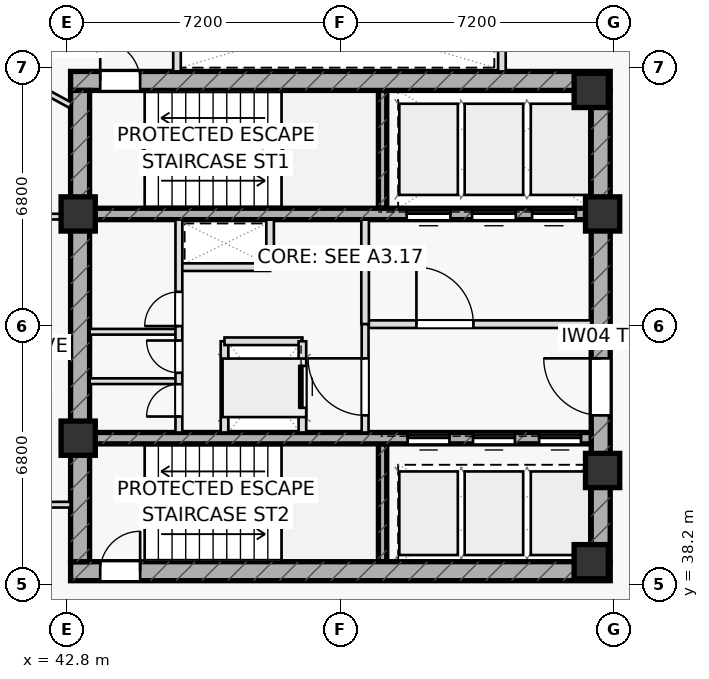
"""IFC4 building model, lengths in metres.
Left out: names, types, materials, properties, quantities, classifications, styles, units other than length and angle.
Written with IfcOpenShell. Run it as: python <this file> out.ifc"""

import sys

from ifc_helpers import new_model, si_unit, direction, frame, frame_2d, origin, origin_2d, place, context, subcontext, project, spatial, rectangle, extrude, element, fill, save


model = new_model("IFC4")
c1 = context("Model", 3, precision=1e-05, world=origin(), true_north=direction((0.0, 1.0)))
c2 = subcontext(c1, "Body", "Model", "MODEL_VIEW")
j1 = project(units=[si_unit("LENGTHUNIT", "METRE"), si_unit("PLANEANGLEUNIT", "RADIAN")], contexts=[c1])
p1 = place(None, origin())
s1 = spatial("IfcSite", under=j1, at=p1, CompositionType="ELEMENT")
p2 = place(p1, origin())
s2 = spatial("IfcBuilding", under=s1, at=p2, CompositionType="ELEMENT")
p3 = place(p2, frame((0.0, 0.0, 177.2)))
s3 = spatial("IfcBuildingStorey", under=s2, at=p3, CompositionType="ELEMENT", Elevation=177.2)
for number, where, z_axis, x_axis in (
    (1, (51.11, 48.1, 0.0), (0.0, 0.0, 1.0), (0.0, 1.0, 0.0)),
    (2, (51.11, 38.8, 0.0), (0.0, 0.0, 1.0), (0.0, 1.0, 0.0)),
):
    element("IfcWall", number, at=place(p3, frame(where, z_axis=z_axis, x_axis=x_axis)), inside=s3, PredefinedType="SHEAR", context=c2, shape_type="SweptSolid", body=[
        extrude(rectangle(XDim=3.1, YDim=0.22, at=frame_2d((1.55, 0.0))), origin(), (0.0, 0.0, 1.0), 3.55),
    ])
p4 = place(p3, frame((42.9, 51.45, 0.0), z_axis=(0.0, 0.0, 1.0), x_axis=(1.0, 0.0, 0.0)))
e3 = element("IfcWall", 3, at=p4, inside=s3, PredefinedType="SHEAR", context=c2, shape_type="SweptSolid", body=[
    extrude(rectangle(XDim=14.2, YDim=0.5, at=frame_2d((7.1, 0.0))), origin(), (0.0, 0.0, 1.0), 3.55),
])
p5 = place(p4, frame((0.78, 0.0, 0.0)))
e4 = element("IfcOpeningElement", 4, at=p5, cuts=e3, PredefinedType="OPENING", context=c2, shape_type="SweptSolid", body=[
    extrude(rectangle(XDim=1.05, YDim=2.2, at=frame_2d((0.525, 1.1))), frame((0.0, 0.26, 0.0), z_axis=(0.0, -1.0, 0.0), x_axis=(1.0, 0.0, 0.0)), (0.0, 0.0, 1.0), 0.52),
])
p6 = place(p3, frame((42.9, 38.55, 0.0), z_axis=(0.0, 0.0, 1.0), x_axis=(1.0, 0.0, 0.0)))
e5 = element("IfcWall", 5, at=p6, inside=s3, PredefinedType="SHEAR", context=c2, shape_type="SweptSolid", body=[
    extrude(rectangle(XDim=14.2, YDim=0.5, at=frame_2d((7.1, 0.0))), origin(), (0.0, 0.0, 1.0), 3.55),
])
p7 = place(p6, frame((0.78, 0.0, 0.0)))
e6 = element("IfcOpeningElement", 6, at=p7, cuts=e5, PredefinedType="OPENING", context=c2, shape_type="SweptSolid", body=[
    extrude(rectangle(XDim=1.05, YDim=2.2, at=frame_2d((0.525, 1.1))), frame((0.0, 0.26, 0.0), z_axis=(0.0, -1.0, 0.0), x_axis=(1.0, 0.0, 0.0)), (0.0, 0.0, 1.0), 0.52),
])
p8 = place(p3, frame((43.15, 38.8, 0.0), z_axis=(0.0, 0.0, 1.0), x_axis=(0.0, 1.0, 0.0)))
e7 = element("IfcWall", 7, at=p8, inside=s3, PredefinedType="SHEAR", context=c2, shape_type="SweptSolid", body=[
    extrude(rectangle(XDim=12.4, YDim=0.5, at=frame_2d((6.2, 0.0))), origin(), (0.0, 0.0, 1.0), 3.55),
])
p9 = place(p3, frame((56.85, 38.8, 0.0), z_axis=(0.0, 0.0, 1.0), x_axis=(0.0, 1.0, 0.0)))
e8 = element("IfcWall", 8, at=p9, inside=s3, PredefinedType="SHEAR", context=c2, shape_type="SweptSolid", body=[
    extrude(rectangle(XDim=12.4, YDim=0.5, at=frame_2d((6.2, 0.0))), origin(), (0.0, 0.0, 1.0), 3.55),
])
p10 = place(p9, frame((3.85, 0.0, 0.0)))
e9 = element("IfcOpeningElement", 9, at=p10, cuts=e8, PredefinedType="OPENING", context=c2, shape_type="SweptSolid", body=[
    extrude(rectangle(XDim=1.5, YDim=2.2, at=frame_2d((0.75, 1.1))), frame((0.0, 0.26, 0.0), z_axis=(0.0, -1.0, 0.0), x_axis=(1.0, 0.0, 0.0)), (0.0, 0.0, 1.0), 0.52),
])
p11 = place(p3, frame((43.4, 47.95, 0.0), z_axis=(0.0, 0.0, 1.0), x_axis=(1.0, 0.0, 0.0)))
e10 = element("IfcWall", 10, at=p11, inside=s3, PredefinedType="SHEAR", context=c2, shape_type="SweptSolid", body=[
    extrude(rectangle(XDim=13.2, YDim=0.3, at=frame_2d((6.6, 0.0))), origin(), (0.0, 0.0, 1.0), 3.55),
])
p12 = place(p11, frame((8.345, 0.0, 0.0)))
e11 = element("IfcOpeningElement", 11, at=p12, cuts=e10, PredefinedType="OPENING", context=c2, shape_type="SweptSolid", body=[
    extrude(rectangle(XDim=1.15, YDim=2.2, at=frame_2d((0.575, 1.1))), frame((0.0, 0.16, 0.0), z_axis=(0.0, -1.0, 0.0), x_axis=(1.0, 0.0, 0.0)), (0.0, 0.0, 1.0), 0.32),
])
p13 = place(p11, frame((10.065, 0.0, 0.0)))
e12 = element("IfcOpeningElement", 12, at=p13, cuts=e10, PredefinedType="OPENING", context=c2, shape_type="SweptSolid", body=[
    extrude(rectangle(XDim=1.15, YDim=2.2, at=frame_2d((0.575, 1.1))), frame((0.0, 0.16, 0.0), z_axis=(0.0, -1.0, 0.0), x_axis=(1.0, 0.0, 0.0)), (0.0, 0.0, 1.0), 0.32),
])
p14 = place(p11, frame((11.645, 0.0, 0.0)))
e13 = element("IfcOpeningElement", 13, at=p14, cuts=e10, PredefinedType="OPENING", context=c2, shape_type="SweptSolid", body=[
    extrude(rectangle(XDim=1.15, YDim=2.2, at=frame_2d((0.575, 1.1))), frame((0.0, 0.16, 0.0), z_axis=(0.0, -1.0, 0.0), x_axis=(1.0, 0.0, 0.0)), (0.0, 0.0, 1.0), 0.32),
])
p15 = place(p3, frame((43.4, 42.05, 0.0), z_axis=(0.0, 0.0, 1.0), x_axis=(1.0, 0.0, 0.0)))
e14 = element("IfcWall", 14, at=p15, inside=s3, PredefinedType="SHEAR", context=c2, shape_type="SweptSolid", body=[
    extrude(rectangle(XDim=13.2, YDim=0.3, at=frame_2d((6.6, 0.0))), origin(), (0.0, 0.0, 1.0), 3.55),
])
p16 = place(p15, frame((8.37, 0.0, 0.0)))
e15 = element("IfcOpeningElement", 15, at=p16, cuts=e14, PredefinedType="OPENING", context=c2, shape_type="SweptSolid", body=[
    extrude(rectangle(XDim=1.1, YDim=2.15, at=frame_2d((0.55, 1.075))), frame((0.0, 0.16, 0.0), z_axis=(0.0, -1.0, 0.0), x_axis=(1.0, 0.0, 0.0)), (0.0, 0.0, 1.0), 0.32),
])
p17 = place(p15, frame((10.09, 0.0, 0.0)))
e16 = element("IfcOpeningElement", 16, at=p17, cuts=e14, PredefinedType="OPENING", context=c2, shape_type="SweptSolid", body=[
    extrude(rectangle(XDim=1.1, YDim=2.15, at=frame_2d((0.55, 1.075))), frame((0.0, 0.16, 0.0), z_axis=(0.0, -1.0, 0.0), x_axis=(1.0, 0.0, 0.0)), (0.0, 0.0, 1.0), 0.32),
])
p18 = place(p15, frame((11.83, 0.0, 0.0)))
e17 = element("IfcOpeningElement", 17, at=p18, cuts=e14, PredefinedType="OPENING", context=c2, shape_type="SweptSolid", body=[
    extrude(rectangle(XDim=1.1, YDim=2.15, at=frame_2d((0.55, 1.075))), frame((0.0, 0.16, 0.0), z_axis=(0.0, -1.0, 0.0), x_axis=(1.0, 0.0, 0.0)), (0.0, 0.0, 1.0), 0.32),
])
for number, where, z_axis, x_axis in (
    (18, (43.1, 47.95, 0.0), (0.0, 0.0, 1.0), (1.0, 0.0, 0.0)),
    (19, (56.9, 47.95, 0.0), (0.0, 0.0, 1.0), (1.0, 0.0, 0.0)),
    (20, (56.6, 51.2, 0.0), (0.0, 0.0, 1.0), (1.0, 0.0, 0.0)),
    (21, (43.1, 42.05, 0.0), (0.0, 0.0, 1.0), (1.0, 0.0, 0.0)),
    (22, (56.9, 41.2, 0.0), (0.0, 0.0, 1.0), (1.0, 0.0, 0.0)),
    (23, (56.6, 38.8, 0.0), (0.0, 0.0, 1.0), (1.0, 0.0, 0.0)),
):
    element("IfcColumn", number, at=place(p3, frame(where, z_axis=z_axis, x_axis=x_axis)), inside=s3, PredefinedType="COLUMN", context=c2, shape_type="SweptSolid", body=[
        extrude(rectangle(XDim=0.9, YDim=0.9, at=origin_2d()), origin(), (0.0, 0.0, 1.0), 3.55),
    ])
for number, where, z_axis, x_axis in (
    (24, (45.7, 51.7, 0.0), (0.0, 0.0, 1.0), (0.0, 1.0, 0.0)),
    (25, (54.25, 51.7, 0.0), (0.0, 0.0, 1.0), (0.0, 1.0, 0.0)),
):
    element("IfcWall", number, at=place(p3, frame(where, z_axis=z_axis, x_axis=x_axis)), inside=s3, PredefinedType="PARTITIONING", context=c2, shape_type="SweptSolid", body=[
        extrude(rectangle(XDim=2.6, YDim=0.2, at=frame_2d((1.3, 0.0))), origin(), (0.0, 0.0, 1.0), 3.55),
    ])
p19 = place(p3, frame((45.75, 46.55, 0.0), z_axis=(0.0, 0.0, 1.0), x_axis=(1.0, 0.0, 0.0)))
e26 = element("IfcWall", 26, at=p19, inside=s3, PredefinedType="PARTITIONING", context=c2, shape_type="SweptSolid", body=[
    extrude(rectangle(XDim=2.4, YDim=0.2, at=frame_2d((1.2, 0.0))), origin(), (0.0, 0.0, 1.0), 3.55),
])
p20 = place(p3, frame((48.15, 46.55, 0.0), z_axis=(0.0, 0.0, 1.0), x_axis=(0.0, 1.0, 0.0)))
e27 = element("IfcWall", 27, at=p20, inside=s3, PredefinedType="PARTITIONING", context=c2, shape_type="SweptSolid", body=[
    extrude(rectangle(XDim=1.25, YDim=0.2, at=frame_2d((0.625, 0.0))), origin(), (0.0, 0.0, 1.0), 3.55),
])
p21 = place(p3, frame((46.95, 42.2, 0.0), z_axis=(0.0, 0.0, 1.0), x_axis=(0.0, 1.0, 0.0)))
e28 = element("IfcWall", 28, at=p21, inside=s3, PredefinedType="PARTITIONING", context=c2, shape_type="SweptSolid", body=[
    extrude(rectangle(XDim=2.4, YDim=0.2, at=frame_2d((1.2, 0.0))), origin(), (0.0, 0.0, 1.0), 3.55),
])
p22 = place(p3, frame((46.95, 44.6, 0.0), z_axis=(0.0, 0.0, 1.0), x_axis=(1.0, 0.0, 0.0)))
e29 = element("IfcWall", 29, at=p22, inside=s3, PredefinedType="PARTITIONING", context=c2, shape_type="SweptSolid", body=[
    extrude(rectangle(XDim=2.05, YDim=0.2, at=frame_2d((1.025, 0.0))), origin(), (0.0, 0.0, 1.0), 3.55),
])
p23 = place(p3, frame((50.65, 45.05, 0.0), z_axis=(0.0, 0.0, 1.0), x_axis=(1.0, 0.0, 0.0)))
e30 = element("IfcWall", 30, at=p23, inside=s3, PredefinedType="PARTITIONING", context=c2, shape_type="SweptSolid", body=[
    extrude(rectangle(XDim=5.95, YDim=0.2, at=frame_2d((2.975, 0.0))), origin(), (0.0, 0.0, 1.0), 3.55),
])
p24 = place(p23, frame((1.35, 0.0, 0.0)))
e31 = element("IfcOpeningElement", 31, at=p24, cuts=e30, PredefinedType="OPENING", context=c2, shape_type="SweptSolid", body=[
    extrude(rectangle(XDim=1.5, YDim=2.2, at=frame_2d((0.75, 1.1))), frame((0.0, 0.11, 0.0), z_axis=(0.0, -1.0, 0.0), x_axis=(1.0, 0.0, 0.0)), (0.0, 0.0, 1.0), 0.22),
])
p25 = place(p3, frame((50.65, 45.05, 0.0), z_axis=(0.0, 0.0, 1.0), x_axis=(0.0, 1.0, 0.0)))
e32 = element("IfcWall", 32, at=p25, inside=s3, PredefinedType="PARTITIONING", context=c2, shape_type="SweptSolid", body=[
    extrude(rectangle(XDim=2.75, YDim=0.2, at=frame_2d((1.375, 0.0))), origin(), (0.0, 0.0, 1.0), 3.55),
])
p26 = place(p3, frame((50.65, 42.2, 0.0), z_axis=(0.0, 0.0, 1.0), x_axis=(0.0, 1.0, 0.0)))
e33 = element("IfcWall", 33, at=p26, inside=s3, PredefinedType="PARTITIONING", context=c2, shape_type="SweptSolid", body=[
    extrude(rectangle(XDim=2.85, YDim=0.18, at=frame_2d((1.425, 0.0))), origin(), (0.0, 0.0, 1.0), 3.55),
])
p27 = place(p26, frame((0.45, 0.0, 0.0)))
e34 = element("IfcOpeningElement", 34, at=p27, cuts=e33, PredefinedType="OPENING", context=c2, shape_type="SweptSolid", body=[
    extrude(rectangle(XDim=1.5, YDim=2.2, at=frame_2d((0.75, 1.1))), frame((0.0, 0.1, 0.0), z_axis=(0.0, -1.0, 0.0), x_axis=(1.0, 0.0, 0.0)), (0.0, 0.0, 1.0), 0.2),
])
for number, where, z_axis, x_axis in (
    (35, (43.4, 43.55, 0.0), (0.0, 0.0, 1.0), (1.0, 0.0, 0.0)),
    (36, (43.4, 44.85, 0.0), (0.0, 0.0, 1.0), (1.0, 0.0, 0.0)),
):
    element("IfcWall", number, at=place(p3, frame(where, z_axis=z_axis, x_axis=x_axis)), inside=s3, PredefinedType="PARTITIONING", context=c2, shape_type="SweptSolid", body=[
        extrude(rectangle(XDim=2.35, YDim=0.15, at=frame_2d((1.175, 0.0))), origin(), (0.0, 0.0, 1.0), 3.55),
    ])
p28 = place(p3, frame((45.75, 42.2, 0.0), z_axis=(0.0, 0.0, 1.0), x_axis=(0.0, 1.0, 0.0)))
e37 = element("IfcWall", 37, at=p28, inside=s3, PredefinedType="PARTITIONING", context=c2, shape_type="SweptSolid", body=[
    extrude(rectangle(XDim=5.6, YDim=0.18, at=frame_2d((2.8, 0.0))), origin(), (0.0, 0.0, 1.0), 3.55),
])
p29 = place(p28, frame((0.42, 0.0, 0.0)))
e38 = element("IfcOpeningElement", 38, at=p29, cuts=e37, PredefinedType="OPENING", context=c2, shape_type="SweptSolid", body=[
    extrude(rectangle(XDim=0.85, YDim=2.05, at=frame_2d((0.425, 1.025))), frame((0.0, 0.1, 0.0), z_axis=(0.0, -1.0, 0.0), x_axis=(1.0, 0.0, 0.0)), (0.0, 0.0, 1.0), 0.2),
])
p30 = place(p28, frame((1.57, 0.0, 0.0)))
e39 = element("IfcOpeningElement", 39, at=p30, cuts=e37, PredefinedType="OPENING", context=c2, shape_type="SweptSolid", body=[
    extrude(rectangle(XDim=0.85, YDim=2.05, at=frame_2d((0.425, 1.025))), frame((0.0, 0.1, 0.0), z_axis=(0.0, -1.0, 0.0), x_axis=(1.0, 0.0, 0.0)), (0.0, 0.0, 1.0), 0.2),
])
p31 = place(p28, frame((2.8, 0.0, 0.0)))
e40 = element("IfcOpeningElement", 40, at=p31, cuts=e37, PredefinedType="OPENING", context=c2, shape_type="SweptSolid", body=[
    extrude(rectangle(XDim=0.9, YDim=2.05, at=frame_2d((0.45, 1.025))), frame((0.0, 0.1, 0.0), z_axis=(0.0, -1.0, 0.0), x_axis=(1.0, 0.0, 0.0)), (0.0, 0.0, 1.0), 0.2),
])
p32 = place(p3, frame((37.14, 40.3, 0.0), z_axis=(0.0, 0.0, 1.0), x_axis=(1.0, 0.0, 0.0)))
e41 = element("IfcWall", 41, at=p32, inside=s3, PredefinedType="PARTITIONING", context=c2, shape_type="SweptSolid", body=[
    extrude(rectangle(XDim=5.76, YDim=0.15, at=frame_2d((2.88, 0.0))), origin(), (0.0, 0.0, 1.0), 3.55),
])
p33 = place(p32, frame((3.21, 0.0, 0.0)))
e42 = element("IfcOpeningElement", 42, at=p33, cuts=e41, PredefinedType="OPENING", context=c2, shape_type="SweptSolid", body=[
    extrude(rectangle(XDim=0.95, YDim=2.05, at=frame_2d((0.475, 1.025))), frame((0.0, 0.085, 0.0), z_axis=(0.0, -1.0, 0.0), x_axis=(1.0, 0.0, 0.0)), (0.0, 0.0, 1.0), 0.17),
])
p34 = place(p3, frame((37.14, 47.88, 0.0), z_axis=(0.0, 0.0, 1.0), x_axis=(1.0, 0.0, 0.0)))
e43 = element("IfcWall", 43, at=p34, inside=s3, PredefinedType="PARTITIONING", context=c2, shape_type="SweptSolid", body=[
    extrude(rectangle(XDim=5.76, YDim=0.15, at=frame_2d((2.88, 0.0))), origin(), (0.0, 0.0, 1.0), 2.935),
])
p35 = place(p3, frame((42.9, 50.81, 0.0), z_axis=(0.0, 0.0, 1.0), x_axis=(-0.878810866854, 0.477170263427, 0.0)))
e44 = element("IfcWall", 44, at=p35, inside=s3, PredefinedType="PARTITIONING", context=c2, shape_type="SweptSolid", body=[
    extrude(rectangle(XDim=10.858, YDim=0.15, at=frame_2d((5.429, 0.0))), origin(), (0.0, 0.0, 1.0), 2.935),
])
p36 = place(p35, frame((1.35, 0.0, 0.0)))
e45 = element("IfcOpeningElement", 45, at=p36, cuts=e44, PredefinedType="OPENING", context=c2, shape_type="SweptSolid", body=[
    extrude(rectangle(XDim=0.95, YDim=2.05, at=frame_2d((0.475, 1.025))), frame((0.0, 0.085, 0.0), z_axis=(0.0, -1.0, 0.0), x_axis=(1.0, 0.0, 0.0)), (0.0, 0.0, 1.0), 0.17),
])
p37 = place(p3, frame((49.0, 42.2, 0.0), z_axis=(0.0, 0.0, 1.0), x_axis=(0.0, 1.0, 0.0)))
e46 = element("IfcWall", 46, at=p37, inside=s3, PredefinedType="PARTITIONING", context=c2, shape_type="SweptSolid", body=[
    extrude(rectangle(XDim=2.4, YDim=0.2, at=frame_2d((1.2, 0.0))), origin(), (0.0, 0.0, 1.0), 3.55),
])
p38 = place(p37, frame((0.65, 0.0, 0.0)))
e47 = element("IfcOpeningElement", 47, at=p38, cuts=e46, PredefinedType="OPENING", context=c2, shape_type="SweptSolid", body=[
    extrude(rectangle(XDim=1.1, YDim=2.15, at=frame_2d((0.55, 1.075))), frame((0.0, 0.11, 0.0), z_axis=(0.0, -1.0, 0.0), x_axis=(1.0, 0.0, 0.0)), (0.0, 0.0, 1.0), 0.22),
])
p39 = place(p5, origin())
e48 = element("IfcDoor", 48, at=p39, inside=s3, OperationType="SINGLE_SWING_LEFT", PredefinedType="DOOR", context=c2, shape_type="SweptSolid", body=[
    extrude(rectangle(XDim=1.05, YDim=2.2, at=frame_2d((0.525, 1.1))), frame((0.0, 0.025, 0.0), z_axis=(0.0, -1.0, 0.0), x_axis=(1.0, 0.0, 0.0)), (0.0, 0.0, 1.0), 0.05),
])
fill(e4, e48)
p40 = place(p7, origin())
e49 = element("IfcDoor", 49, at=p40, inside=s3, OperationType="SINGLE_SWING_RIGHT", PredefinedType="DOOR", context=c2, shape_type="SweptSolid", body=[
    extrude(rectangle(XDim=1.05, YDim=2.2, at=frame_2d((0.525, 1.1))), frame((0.0, 0.025, 0.0), z_axis=(0.0, -1.0, 0.0), x_axis=(1.0, 0.0, 0.0)), (0.0, 0.0, 1.0), 0.05),
])
fill(e6, e49)
p41 = place(p10, origin())
e50 = element("IfcDoor", 50, at=p41, inside=s3, OperationType="SINGLE_SWING_RIGHT", PredefinedType="DOOR", context=c2, shape_type="SweptSolid", body=[
    extrude(rectangle(XDim=1.5, YDim=2.2, at=frame_2d((0.75, 1.1))), frame((0.0, 0.025, 0.0), z_axis=(0.0, -1.0, 0.0), x_axis=(1.0, 0.0, 0.0)), (0.0, 0.0, 1.0), 0.05),
])
fill(e9, e50)
p42 = place(p24, origin())
e51 = element("IfcDoor", 51, at=p42, inside=s3, OperationType="SINGLE_SWING_LEFT", PredefinedType="DOOR", context=c2, shape_type="SweptSolid", body=[
    extrude(rectangle(XDim=1.5, YDim=2.2, at=frame_2d((0.75, 1.1))), frame((0.0, 0.025, 0.0), z_axis=(0.0, -1.0, 0.0), x_axis=(1.0, 0.0, 0.0)), (0.0, 0.0, 1.0), 0.05),
])
fill(e31, e51)
p43 = place(p27, origin())
e52 = element("IfcDoor", 52, at=p43, inside=s3, OperationType="SINGLE_SWING_RIGHT", PredefinedType="DOOR", context=c2, shape_type="SweptSolid", body=[
    extrude(rectangle(XDim=1.5, YDim=2.2, at=frame_2d((0.75, 1.1))), frame((0.0, 0.025, 0.0), z_axis=(0.0, -1.0, 0.0), x_axis=(1.0, 0.0, 0.0)), (0.0, 0.0, 1.0), 0.05),
])
fill(e34, e52)
p44 = place(p29, origin())
e53 = element("IfcDoor", 53, at=p44, inside=s3, OperationType="SINGLE_SWING_LEFT", PredefinedType="DOOR", context=c2, shape_type="SweptSolid", body=[
    extrude(rectangle(XDim=0.85, YDim=2.05, at=frame_2d((0.425, 1.025))), frame((0.0, 0.025, 0.0), z_axis=(0.0, -1.0, 0.0), x_axis=(1.0, 0.0, 0.0)), (0.0, 0.0, 1.0), 0.05),
])
fill(e38, e53)
p45 = place(p30, origin())
e54 = element("IfcDoor", 54, at=p45, inside=s3, OperationType="SINGLE_SWING_RIGHT", PredefinedType="DOOR", context=c2, shape_type="SweptSolid", body=[
    extrude(rectangle(XDim=0.85, YDim=2.05, at=frame_2d((0.425, 1.025))), frame((0.0, 0.025, 0.0), z_axis=(0.0, -1.0, 0.0), x_axis=(1.0, 0.0, 0.0)), (0.0, 0.0, 1.0), 0.05),
])
fill(e39, e54)
p46 = place(p31, origin())
e55 = element("IfcDoor", 55, at=p46, inside=s3, OperationType="SINGLE_SWING_LEFT", PredefinedType="DOOR", context=c2, shape_type="SweptSolid", body=[
    extrude(rectangle(XDim=0.9, YDim=2.05, at=frame_2d((0.45, 1.025))), frame((0.0, 0.025, 0.0), z_axis=(0.0, -1.0, 0.0), x_axis=(1.0, 0.0, 0.0)), (0.0, 0.0, 1.0), 0.05),
])
fill(e40, e55)
p47 = place(p12, origin())
e56 = element("IfcDoor", 56, at=p47, inside=s3, OperationType="SLIDING_TO_LEFT", PredefinedType="DOOR", context=c2, shape_type="SweptSolid", body=[
    extrude(rectangle(XDim=1.15, YDim=2.2, at=frame_2d((0.575, 1.1))), frame((0.0, 0.025, 0.0), z_axis=(0.0, -1.0, 0.0), x_axis=(1.0, 0.0, 0.0)), (0.0, 0.0, 1.0), 0.05),
])
fill(e11, e56)
p48 = place(p13, origin())
e57 = element("IfcDoor", 57, at=p48, inside=s3, OperationType="SLIDING_TO_LEFT", PredefinedType="DOOR", context=c2, shape_type="SweptSolid", body=[
    extrude(rectangle(XDim=1.15, YDim=2.2, at=frame_2d((0.575, 1.1))), frame((0.0, 0.025, 0.0), z_axis=(0.0, -1.0, 0.0), x_axis=(1.0, 0.0, 0.0)), (0.0, 0.0, 1.0), 0.05),
])
fill(e12, e57)
p49 = place(p14, origin())
e58 = element("IfcDoor", 58, at=p49, inside=s3, OperationType="SLIDING_TO_LEFT", PredefinedType="DOOR", context=c2, shape_type="SweptSolid", body=[
    extrude(rectangle(XDim=1.15, YDim=2.2, at=frame_2d((0.575, 1.1))), frame((0.0, 0.025, 0.0), z_axis=(0.0, -1.0, 0.0), x_axis=(1.0, 0.0, 0.0)), (0.0, 0.0, 1.0), 0.05),
])
fill(e13, e58)
p50 = place(p16, origin())
e59 = element("IfcDoor", 59, at=p50, inside=s3, OperationType="SLIDING_TO_LEFT", PredefinedType="DOOR", context=c2, shape_type="SweptSolid", body=[
    extrude(rectangle(XDim=1.1, YDim=2.15, at=frame_2d((0.55, 1.075))), frame((0.0, 0.025, 0.0), z_axis=(0.0, -1.0, 0.0), x_axis=(1.0, 0.0, 0.0)), (0.0, 0.0, 1.0), 0.05),
])
fill(e15, e59)
p51 = place(p17, origin())
e60 = element("IfcDoor", 60, at=p51, inside=s3, OperationType="SLIDING_TO_LEFT", PredefinedType="DOOR", context=c2, shape_type="SweptSolid", body=[
    extrude(rectangle(XDim=1.1, YDim=2.15, at=frame_2d((0.55, 1.075))), frame((0.0, 0.025, 0.0), z_axis=(0.0, -1.0, 0.0), x_axis=(1.0, 0.0, 0.0)), (0.0, 0.0, 1.0), 0.05),
])
fill(e16, e60)
p52 = place(p18, origin())
e61 = element("IfcDoor", 61, at=p52, inside=s3, OperationType="SLIDING_TO_LEFT", PredefinedType="DOOR", context=c2, shape_type="SweptSolid", body=[
    extrude(rectangle(XDim=1.1, YDim=2.15, at=frame_2d((0.55, 1.075))), frame((0.0, 0.025, 0.0), z_axis=(0.0, -1.0, 0.0), x_axis=(1.0, 0.0, 0.0)), (0.0, 0.0, 1.0), 0.05),
])
fill(e17, e61)
p53 = place(p38, origin())
e62 = element("IfcDoor", 62, at=p53, inside=s3, OperationType="SLIDING_TO_RIGHT", PredefinedType="DOOR", context=c2, shape_type="SweptSolid", body=[
    extrude(rectangle(XDim=1.1, YDim=2.15, at=frame_2d((0.55, 1.075))), frame((0.0, 0.025, 0.0), z_axis=(0.0, -1.0, 0.0), x_axis=(1.0, 0.0, 0.0)), (0.0, 0.0, 1.0), 0.05),
])
fill(e47, e62)
save(model, sys.argv[1])
